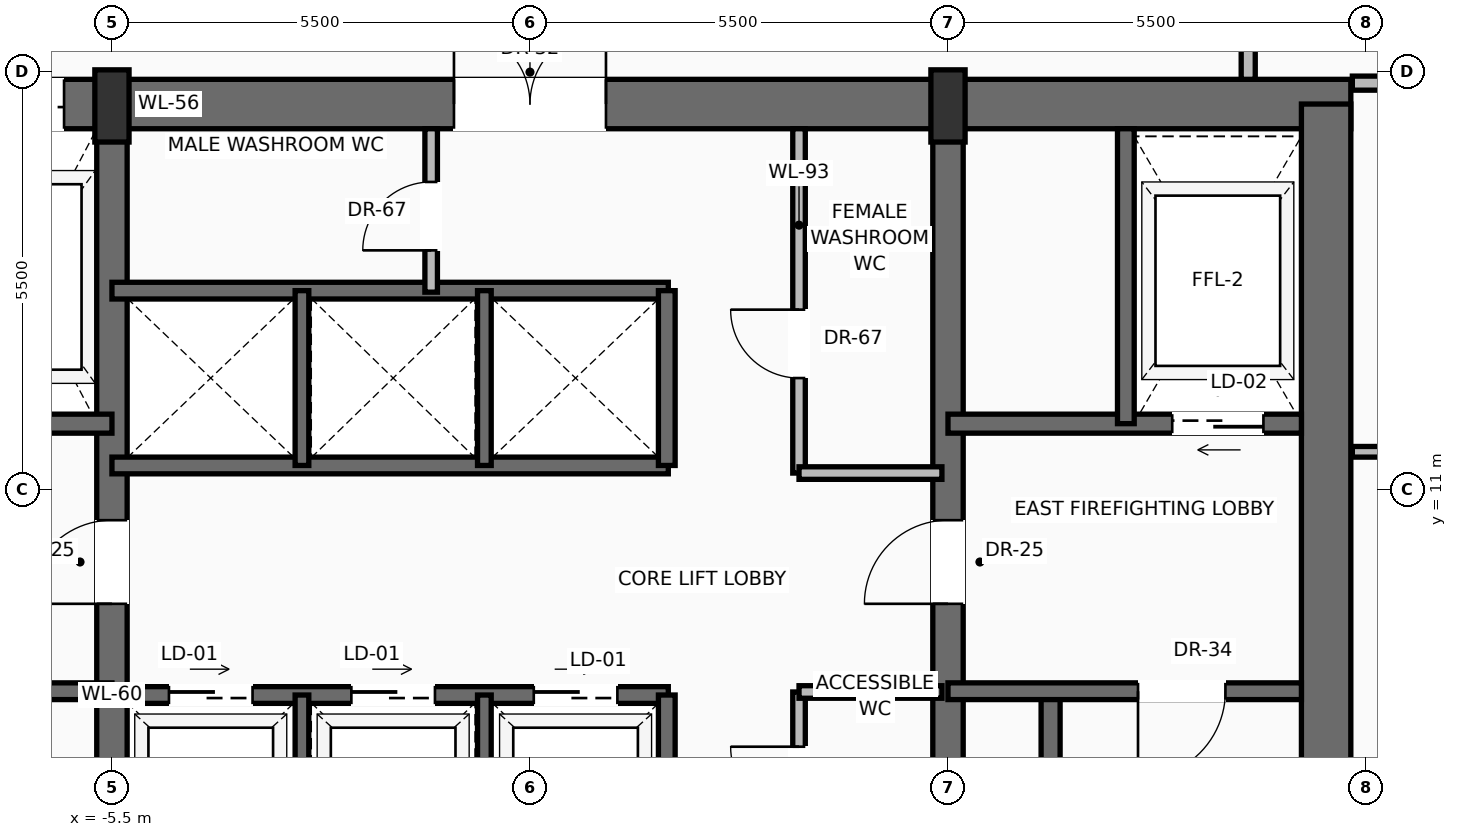
"""IFC4 building model, lengths in metres.
Left out: names, types, materials, properties, quantities, classifications, styles, units other than length and angle.
Written with IfcOpenShell. Run it as: python <this file> out.ifc"""

import sys

from ifc_helpers import new_model, si_unit, direction, frame, frame_2d, origin, origin_2d, place, context, subcontext, project, spatial, rectangle, extrude, source, transform, mapped, element, fill, save


model = new_model("IFC4")
c1 = context("Model", 3, precision=1e-05, world=origin(), true_north=direction((0.0, 1.0)))
c2 = subcontext(c1, "Body", "Model", "MODEL_VIEW")
j1 = project(units=[si_unit("LENGTHUNIT", "METRE"), si_unit("PLANEANGLEUNIT", "RADIAN")], contexts=[c1])
p1 = place(None, origin())
s1 = spatial("IfcSite", under=j1, at=p1, CompositionType="ELEMENT")
p2 = place(p1, origin())
s2 = spatial("IfcBuilding", under=s1, at=p2, CompositionType="ELEMENT")
p3 = place(p2, frame((0.0, 0.0, 193.2)))
s3 = spatial("IfcBuildingStorey", under=s2, at=p3, CompositionType="ELEMENT", Elevation=193.2)
p4 = place(p3, frame((-10.8, 16.075, 0.0), z_axis=(0.0, 0.0, 1.0), x_axis=(1.0, 0.0, 0.0)))
e1 = element("IfcWall", 1, at=p4, inside=s3, PredefinedType="SHEAR", context=c2, shape_type="SweptSolid", body=[
    extrude(rectangle(XDim=21.6, YDim=0.65, at=frame_2d((10.8, 0.0))), origin(), (0.0, 0.0, 1.0), 3.47),
])
p5 = place(p4, frame((3.37, 0.0, 0.0)))
e2 = element("IfcOpeningElement", 2, at=p5, cuts=e1, PredefinedType="OPENING", context=c2, shape_type="SweptSolid", body=[
    extrude(rectangle(XDim=1.3, YDim=2.3, at=frame_2d((0.65, 1.15))), frame((0.0, 0.335, 0.0), z_axis=(0.0, -1.0, 0.0), x_axis=(1.0, 0.0, 0.0)), (0.0, 0.0, 1.0), 0.67),
])
p6 = place(p4, frame((9.8, 0.0, 0.0)))
e3 = element("IfcOpeningElement", 3, at=p6, cuts=e1, PredefinedType="OPENING", context=c2, shape_type="SweptSolid", body=[
    extrude(rectangle(XDim=2.0, YDim=2.4, at=frame_2d((1.0, 1.2))), frame((0.0, 0.335, 0.0), z_axis=(0.0, -1.0, 0.0), x_axis=(1.0, 0.0, 0.0)), (0.0, 0.0, 1.0), 0.67),
])
p7 = place(p3, frame((10.475, 0.525, 0.0), z_axis=(0.0, 0.0, 1.0), x_axis=(0.0, 1.0, 0.0)))
e4 = element("IfcWall", 4, at=p7, inside=s3, PredefinedType="SHEAR", context=c2, shape_type="SweptSolid", body=[
    extrude(rectangle(XDim=15.55, YDim=0.65, at=frame_2d((7.775, 0.0))), origin(), (0.0, 0.0, 1.0), 3.47),
])
p8 = place(p3, frame((-5.5, 0.525, 0.0), z_axis=(0.0, 0.0, 1.0), x_axis=(0.0, 1.0, 0.0)))
e5 = element("IfcWall", 5, at=p8, inside=s3, PredefinedType="SHEAR", context=c2, shape_type="SweptSolid", body=[
    extrude(rectangle(XDim=15.55, YDim=0.4, at=frame_2d((7.775, 0.0))), origin(), (0.0, 0.0, 1.0), 3.47),
])
p9 = place(p8, frame((8.975, 0.0, 0.0)))
e6 = element("IfcOpeningElement", 6, at=p9, cuts=e5, PredefinedType="OPENING", context=c2, shape_type="SweptSolid", body=[
    extrude(rectangle(XDim=1.1, YDim=2.2, at=frame_2d((0.55, 1.1))), frame((0.0, 0.21, 0.0), z_axis=(0.0, -1.0, 0.0), x_axis=(1.0, 0.0, 0.0)), (0.0, 0.0, 1.0), 0.42),
])
p10 = place(p3, frame((5.5, 0.525, 0.0), z_axis=(0.0, 0.0, 1.0), x_axis=(0.0, 1.0, 0.0)))
e7 = element("IfcWall", 7, at=p10, inside=s3, PredefinedType="SHEAR", context=c2, shape_type="SweptSolid", body=[
    extrude(rectangle(XDim=15.55, YDim=0.4, at=frame_2d((7.775, 0.0))), origin(), (0.0, 0.0, 1.0), 3.47),
])
p11 = place(p10, frame((8.975, 0.0, 0.0)))
e8 = element("IfcOpeningElement", 8, at=p11, cuts=e7, PredefinedType="OPENING", context=c2, shape_type="SweptSolid", body=[
    extrude(rectangle(XDim=1.1, YDim=2.2, at=frame_2d((0.55, 1.1))), frame((0.0, 0.21, 0.0), z_axis=(0.0, -1.0, 0.0), x_axis=(1.0, 0.0, 0.0)), (0.0, 0.0, 1.0), 0.42),
])
m1 = source(origin(), c2, "Body", "SweptSolid", [
    extrude(rectangle(XDim=0.45, YDim=0.95, at=origin_2d()), origin(), (0.0, 0.0, 1.0), 3.7),
])
for number, where, z_axis, x_axis in (
    (9, (-5.5, 16.05, 0.0), (0.0, 0.0, 1.0), (1.0, 0.0, 0.0)),
    (10, (5.5, 16.05, 0.0), (0.0, 0.0, 1.0), (1.0, 0.0, 0.0)),
):
    element("IfcColumn", number, at=place(p3, frame(where, z_axis=z_axis, x_axis=x_axis)), inside=s3, PredefinedType="PILASTER", context=c2, shape_type="MappedRepresentation", body=[
        mapped(m1, transform((0.0, 0.0, 0.0), scale=1.0)),
    ])
p12 = place(p3, frame((9.726, 32.379, 0.0), z_axis=(0.0, 0.0, 1.0), x_axis=(0.534579680482, -0.845118077676, 0.0)))
e11 = element("IfcWall", 11, at=p12, inside=s3, PredefinedType="SOLIDWALL", context=c2, shape_type="SweptSolid", body=[
    extrude(rectangle(XDim=18.987, YDim=0.28, at=frame_2d((9.494, 0.0))), origin(), (0.0, 0.0, 1.0), 3.05),
])
p13 = place(p12, frame((4.557, 0.0, 0.0)))
e12 = element("IfcOpeningElement", 12, at=p13, cuts=e11, PredefinedType="OPENING", context=c2, shape_type="SweptSolid", body=[
    extrude(rectangle(XDim=1.6, YDim=2.35, at=frame_2d((0.8, 1.175))), frame((0.0, 0.15, 0.0), z_axis=(0.0, -1.0, 0.0), x_axis=(1.0, 0.0, 0.0)), (0.0, 0.0, 1.0), 0.3),
])
p14 = place(p12, frame((12.911, 0.0, 0.9)))
e13 = element("IfcOpeningElement", 13, at=p14, cuts=e11, PredefinedType="OPENING", context=c2, shape_type="SweptSolid", body=[
    extrude(rectangle(XDim=1.55, YDim=1.85, at=frame_2d((0.775, 0.925))), frame((0.0, 0.15, 0.0), z_axis=(0.0, -1.0, 0.0), x_axis=(1.0, 0.0, 0.0)), (0.0, 0.0, 1.0), 0.3),
])
p15 = place(p3, frame((-5.5, 8.35, 0.0), z_axis=(0.0, 0.0, 1.0), x_axis=(-1.0, 0.0, 0.0)))
e14 = element("IfcWall", 14, at=p15, inside=s3, PredefinedType="SOLIDWALL", context=c2, shape_type="SweptSolid", body=[
    extrude(rectangle(XDim=4.65, YDim=0.22, at=frame_2d((2.325, 0.0))), origin(), (0.0, 0.0, 1.0), 3.47),
])
p16 = place(p15, frame((2.5, 0.0, 0.0)))
e15 = element("IfcOpeningElement", 15, at=p16, cuts=e14, PredefinedType="OPENING", context=c2, shape_type="SweptSolid", body=[
    extrude(rectangle(XDim=1.15, YDim=2.2, at=frame_2d((0.575, 1.1))), frame((0.0, 0.12, 0.0), z_axis=(0.0, -1.0, 0.0), x_axis=(1.0, 0.0, 0.0)), (0.0, 0.0, 1.0), 0.24),
])
p17 = place(p3, frame((-5.5, 11.87, 0.0), z_axis=(0.0, 0.0, 1.0), x_axis=(-1.0, 0.0, 0.0)))
e16 = element("IfcWall", 16, at=p17, inside=s3, PredefinedType="SOLIDWALL", context=c2, shape_type="SweptSolid", body=[
    extrude(rectangle(XDim=4.65, YDim=0.25, at=frame_2d((2.325, 0.0))), origin(), (0.0, 0.0, 1.0), 3.47),
])
p18 = place(p17, frame((2.95, 0.0, 0.0)))
e17 = element("IfcOpeningElement", 17, at=p18, cuts=e16, PredefinedType="OPENING", context=c2, shape_type="SweptSolid", body=[
    extrude(rectangle(XDim=1.2, YDim=2.25, at=frame_2d((0.6, 1.125))), frame((0.0, 0.135, 0.0), z_axis=(0.0, -1.0, 0.0), x_axis=(1.0, 0.0, 0.0)), (0.0, 0.0, 1.0), 0.27),
])
p19 = place(p3, frame((6.85, 0.85, 0.0), z_axis=(0.0, 0.0, 1.0), x_axis=(0.0, 1.0, 0.0)))
e18 = element("IfcWall", 18, at=p19, inside=s3, PredefinedType="SOLIDWALL", context=c2, shape_type="SweptSolid", body=[
    extrude(rectangle(XDim=7.5, YDim=0.25, at=frame_2d((3.75, 0.0))), origin(), (0.0, 0.0, 1.0), 3.47),
])
p20 = place(p3, frame((10.15, 8.35, 0.0), z_axis=(0.0, 0.0, 1.0), x_axis=(-1.0, 0.0, 0.0)))
e19 = element("IfcWall", 19, at=p20, inside=s3, PredefinedType="SOLIDWALL", context=c2, shape_type="SweptSolid", body=[
    extrude(rectangle(XDim=4.65, YDim=0.22, at=frame_2d((2.325, 0.0))), origin(), (0.0, 0.0, 1.0), 3.47),
])
p21 = place(p20, frame((1.0, 0.0, 0.0)))
e20 = element("IfcOpeningElement", 20, at=p21, cuts=e19, PredefinedType="OPENING", context=c2, shape_type="SweptSolid", body=[
    extrude(rectangle(XDim=1.15, YDim=2.2, at=frame_2d((0.575, 1.1))), frame((0.0, 0.12, 0.0), z_axis=(0.0, -1.0, 0.0), x_axis=(1.0, 0.0, 0.0)), (0.0, 0.0, 1.0), 0.24),
])
p22 = place(p3, frame((10.15, 11.87, 0.0), z_axis=(0.0, 0.0, 1.0), x_axis=(-1.0, 0.0, 0.0)))
e21 = element("IfcWall", 21, at=p22, inside=s3, PredefinedType="SOLIDWALL", context=c2, shape_type="SweptSolid", body=[
    extrude(rectangle(XDim=4.65, YDim=0.25, at=frame_2d((2.325, 0.0))), origin(), (0.0, 0.0, 1.0), 3.47),
])
p23 = place(p22, frame((0.5, 0.0, 0.0)))
e22 = element("IfcOpeningElement", 22, at=p23, cuts=e21, PredefinedType="OPENING", context=c2, shape_type="SweptSolid", body=[
    extrude(rectangle(XDim=1.2, YDim=2.25, at=frame_2d((0.6, 1.125))), frame((0.0, 0.135, 0.0), z_axis=(0.0, -1.0, 0.0), x_axis=(1.0, 0.0, 0.0)), (0.0, 0.0, 1.0), 0.27),
])
p24 = place(p3, frame((7.84, 11.87, 0.0), z_axis=(0.0, 0.0, 1.0), x_axis=(0.0, 1.0, 0.0)))
e23 = element("IfcWall", 23, at=p24, inside=s3, PredefinedType="SOLIDWALL", context=c2, shape_type="SweptSolid", body=[
    extrude(rectangle(XDim=3.88, YDim=0.22, at=frame_2d((1.94, 0.0))), origin(), (0.0, 0.0, 1.0), 3.47),
])
p25 = place(p3, frame((3.54, 6.0, 0.0), z_axis=(0.0, 0.0, 1.0), x_axis=(0.0, 1.0, 0.0)))
e24 = element("IfcWall", 24, at=p25, inside=s3, PredefinedType="PARTITIONING", context=c2, shape_type="SweptSolid", body=[
    extrude(rectangle(XDim=2.34, YDim=0.165, at=frame_2d((1.17, 0.0))), origin(), (0.0, 0.0, 1.0), 3.462),
])
p26 = place(p25, frame((0.72, 0.0, 0.0)))
e25 = element("IfcOpeningElement", 25, at=p26, cuts=e24, PredefinedType="OPENING", context=c2, shape_type="SweptSolid", body=[
    extrude(rectangle(XDim=0.9, YDim=2.1, at=frame_2d((0.45, 1.05))), frame((0.0, 0.093, 0.0), z_axis=(0.0, -1.0, 0.0), x_axis=(1.0, 0.0, 0.0)), (0.0, 0.0, 1.0), 0.185),
])
p27 = place(p3, frame((3.54, 8.34, 0.0), z_axis=(0.0, 0.0, 1.0), x_axis=(1.0, 0.0, 0.0)))
e26 = element("IfcWall", 26, at=p27, inside=s3, PredefinedType="PARTITIONING", context=c2, shape_type="SweptSolid", body=[
    extrude(rectangle(XDim=1.88, YDim=0.165, at=frame_2d((0.94, 0.0))), origin(), (0.0, 0.0, 1.0), 3.462),
])
p28 = place(p3, frame((-5.5, 8.3, 0.0), z_axis=(0.0, 0.0, 1.0), x_axis=(1.0, 0.0, 0.0)))
e27 = element("IfcWall", 27, at=p28, inside=s3, PredefinedType="SOLIDWALL", context=c2, shape_type="SweptSolid", body=[
    extrude(rectangle(XDim=7.32, YDim=0.22, at=frame_2d((3.66, 0.0))), origin(), (0.0, 0.0, 1.0), 3.47),
])
p29 = place(p28, frame((0.75, 0.0, 0.0)))
e28 = element("IfcOpeningElement", 28, at=p29, cuts=e27, PredefinedType="OPENING", context=c2, shape_type="SweptSolid", body=[
    extrude(rectangle(XDim=1.1, YDim=2.2, at=frame_2d((0.55, 1.1))), frame((0.0, 0.12, 0.0), z_axis=(0.0, -1.0, 0.0), x_axis=(1.0, 0.0, 0.0)), (0.0, 0.0, 1.0), 0.24),
])
p30 = place(p28, frame((3.15, 0.0, 0.0)))
e29 = element("IfcOpeningElement", 29, at=p30, cuts=e27, PredefinedType="OPENING", context=c2, shape_type="SweptSolid", body=[
    extrude(rectangle(XDim=1.1, YDim=2.2, at=frame_2d((0.55, 1.1))), frame((0.0, 0.12, 0.0), z_axis=(0.0, -1.0, 0.0), x_axis=(1.0, 0.0, 0.0)), (0.0, 0.0, 1.0), 0.24),
])
p31 = place(p28, frame((5.55, 0.0, 0.0)))
e30 = element("IfcOpeningElement", 30, at=p31, cuts=e27, PredefinedType="OPENING", context=c2, shape_type="SweptSolid", body=[
    extrude(rectangle(XDim=1.1, YDim=2.2, at=frame_2d((0.55, 1.1))), frame((0.0, 0.12, 0.0), z_axis=(0.0, -1.0, 0.0), x_axis=(1.0, 0.0, 0.0)), (0.0, 0.0, 1.0), 0.24),
])
p32 = place(p3, frame((1.8, 6.0, 0.0), z_axis=(0.0, 0.0, 1.0), x_axis=(0.0, 1.0, 0.0)))
e31 = element("IfcWall", 31, at=p32, inside=s3, PredefinedType="SOLIDWALL", context=c2, shape_type="SweptSolid", body=[
    extrude(rectangle(XDim=2.3, YDim=0.22, at=frame_2d((1.15, 0.0))), origin(), (0.0, 0.0, 1.0), 3.47),
])
for number, where, z_axis, x_axis in (
    (32, (-3.0, 6.0, 0.0), (0.0, 0.0, 1.0), (0.0, 1.0, 0.0)),
    (33, (-0.6, 6.0, 0.0), (0.0, 0.0, 1.0), (0.0, 1.0, 0.0)),
):
    element("IfcWall", number, at=place(p3, frame(where, z_axis=z_axis, x_axis=x_axis)), inside=s3, PredefinedType="SOLIDWALL", context=c2, shape_type="SweptSolid", body=[
        extrude(rectangle(XDim=2.3, YDim=0.18, at=frame_2d((1.15, 0.0))), origin(), (0.0, 0.0, 1.0), 3.47),
    ])
for number, where, z_axis, x_axis in (
    (34, (-5.5, 11.32, 0.0), (0.0, 0.0, 1.0), (1.0, 0.0, 0.0)),
    (35, (-5.5, 13.62, 0.0), (0.0, 0.0, 1.0), (1.0, 0.0, 0.0)),
):
    element("IfcWall", number, at=place(p3, frame(where, z_axis=z_axis, x_axis=x_axis)), inside=s3, PredefinedType="SOLIDWALL", context=c2, shape_type="SweptSolid", body=[
        extrude(rectangle(XDim=7.32, YDim=0.22, at=frame_2d((3.66, 0.0))), origin(), (0.0, 0.0, 1.0), 3.47),
    ])
p33 = place(p3, frame((1.8, 11.32, 0.0), z_axis=(0.0, 0.0, 1.0), x_axis=(0.0, 1.0, 0.0)))
e36 = element("IfcWall", 36, at=p33, inside=s3, PredefinedType="SOLIDWALL", context=c2, shape_type="SweptSolid", body=[
    extrude(rectangle(XDim=2.3, YDim=0.22, at=frame_2d((1.15, 0.0))), origin(), (0.0, 0.0, 1.0), 3.47),
])
for number, where, z_axis, x_axis in (
    (37, (-3.0, 11.32, 0.0), (0.0, 0.0, 1.0), (0.0, 1.0, 0.0)),
    (38, (-0.6, 11.32, 0.0), (0.0, 0.0, 1.0), (0.0, 1.0, 0.0)),
):
    element("IfcWall", number, at=place(p3, frame(where, z_axis=z_axis, x_axis=x_axis)), inside=s3, PredefinedType="SOLIDWALL", context=c2, shape_type="SweptSolid", body=[
        extrude(rectangle(XDim=2.3, YDim=0.18, at=frame_2d((1.15, 0.0))), origin(), (0.0, 0.0, 1.0), 3.47),
    ])
p34 = place(p3, frame((-1.3, 13.6, 0.0), z_axis=(0.0, 0.0, 1.0), x_axis=(0.0, 1.0, 0.0)))
e39 = element("IfcWall", 39, at=p34, inside=s3, PredefinedType="PARTITIONING", context=c2, shape_type="SweptSolid", body=[
    extrude(rectangle(XDim=2.15, YDim=0.165, at=frame_2d((1.075, 0.0))), origin(), (0.0, 0.0, 1.0), 3.462),
])
p35 = place(p34, frame((0.55, 0.0, 0.0)))
e40 = element("IfcOpeningElement", 40, at=p35, cuts=e39, PredefinedType="OPENING", context=c2, shape_type="SweptSolid", body=[
    extrude(rectangle(XDim=0.9, YDim=2.1, at=frame_2d((0.45, 1.05))), frame((0.0, 0.093, 0.0), z_axis=(0.0, -1.0, 0.0), x_axis=(1.0, 0.0, 0.0)), (0.0, 0.0, 1.0), 0.185),
])
p36 = place(p3, frame((3.54, 11.22, 0.0), z_axis=(0.0, 0.0, 1.0), x_axis=(0.0, 1.0, 0.0)))
e41 = element("IfcWall", 41, at=p36, inside=s3, PredefinedType="PARTITIONING", context=c2, shape_type="SweptSolid", body=[
    extrude(rectangle(XDim=4.53, YDim=0.165, at=frame_2d((2.265, 0.0))), origin(), (0.0, 0.0, 1.0), 3.462),
])
p37 = place(p36, frame((1.25, 0.0, 0.0)))
e42 = element("IfcOpeningElement", 42, at=p37, cuts=e41, PredefinedType="OPENING", context=c2, shape_type="SweptSolid", body=[
    extrude(rectangle(XDim=0.9, YDim=2.1, at=frame_2d((0.45, 1.05))), frame((0.0, 0.093, 0.0), z_axis=(0.0, -1.0, 0.0), x_axis=(1.0, 0.0, 0.0)), (0.0, 0.0, 1.0), 0.185),
])
p38 = place(p3, frame((3.54, 11.22, 0.0), z_axis=(0.0, 0.0, 1.0), x_axis=(1.0, 0.0, 0.0)))
e43 = element("IfcWall", 43, at=p38, inside=s3, PredefinedType="PARTITIONING", context=c2, shape_type="SweptSolid", body=[
    extrude(rectangle(XDim=1.88, YDim=0.165, at=frame_2d((0.94, 0.0))), origin(), (0.0, 0.0, 1.0), 3.462),
])
p39 = place(p3, frame((9.45, 16.4, 0.0), z_axis=(0.0, 0.0, 1.0), x_axis=(0.0, 1.0, 0.0)))
e44 = element("IfcWall", 44, at=p39, inside=s3, PredefinedType="PARTITIONING", context=c2, shape_type="SweptSolid", body=[
    extrude(rectangle(XDim=7.0, YDim=0.185, at=frame_2d((3.5, 0.0))), origin(), (0.0, 0.0, 1.0), 3.462),
])
p40 = place(p39, frame((3.341, 0.0, 0.0)))
e45 = element("IfcOpeningElement", 45, at=p40, cuts=e44, PredefinedType="OPENING", context=c2, shape_type="SweptSolid", body=[
    extrude(rectangle(XDim=0.95, YDim=2.2, at=frame_2d((0.475, 1.1))), frame((0.0, 0.103, 0.0), z_axis=(0.0, -1.0, 0.0), x_axis=(1.0, 0.0, 0.0)), (0.0, 0.0, 1.0), 0.205),
])
p41 = place(p3, frame((10.82, 16.35, 0.0), z_axis=(0.0, 0.0, 1.0), x_axis=(1.0, 0.0, 0.0)))
e46 = element("IfcWall", 46, at=p41, inside=s3, PredefinedType="PARTITIONING", context=c2, shape_type="SweptSolid", body=[
    extrude(rectangle(XDim=9.199, YDim=0.185, at=frame_2d((4.599, 0.0))), origin(), (0.0, 0.0, 1.0), 3.462),
])
p42 = place(p41, frame((2.847, 0.0, 0.0)))
e47 = element("IfcOpeningElement", 47, at=p42, cuts=e46, PredefinedType="OPENING", context=c2, shape_type="SweptSolid", body=[
    extrude(rectangle(XDim=0.95, YDim=2.2, at=frame_2d((0.475, 1.1))), frame((0.0, 0.103, 0.0), z_axis=(0.0, -1.0, 0.0), x_axis=(1.0, 0.0, 0.0)), (0.0, 0.0, 1.0), 0.205),
])
p43 = place(p3, frame((10.82, 11.5, 0.0), z_axis=(0.0, 0.0, 1.0), x_axis=(1.0, 0.0, 0.0)))
e48 = element("IfcWall", 48, at=p43, inside=s3, PredefinedType="PARTITIONING", context=c2, shape_type="SweptSolid", body=[
    extrude(rectangle(XDim=12.267, YDim=0.14, at=frame_2d((6.133, 0.0))), origin(), (0.0, 0.0, 1.0), 3.462),
])
p44 = place(p43, frame((5.651, 0.0, 0.0)))
e49 = element("IfcOpeningElement", 49, at=p44, cuts=e48, PredefinedType="OPENING", context=c2, shape_type="SweptSolid", body=[
    extrude(rectangle(XDim=0.95, YDim=2.2, at=frame_2d((0.475, 1.1))), frame((0.0, 0.08, 0.0), z_axis=(0.0, -1.0, 0.0), x_axis=(1.0, 0.0, 0.0)), (0.0, 0.0, 1.0), 0.16),
])
m2 = source(origin(), c2, "Body", "SweptSolid", [
    extrude(rectangle(XDim=1.1, YDim=2.2, at=frame_2d((0.55, 1.1))), frame((0.0, 0.025, 0.0), z_axis=(0.0, -1.0, 0.0), x_axis=(1.0, 0.0, 0.0)), (0.0, 0.0, 1.0), 0.05),
])
p45 = place(p9, origin())
e50 = element("IfcDoor", 50, at=p45, inside=s3, OperationType="SINGLE_SWING_LEFT", PredefinedType="DOOR", context=c2, shape_type="MappedRepresentation", body=[
    mapped(m2, transform((0.0, 0.0, 0.0), scale=1.0)),
])
fill(e6, e50)
m3 = source(origin(), c2, "Body", "SweptSolid", [
    extrude(rectangle(XDim=1.3, YDim=2.3, at=frame_2d((0.65, 1.15))), frame((0.0, 0.025, 0.0), z_axis=(0.0, -1.0, 0.0), x_axis=(1.0, 0.0, 0.0)), (0.0, 0.0, 1.0), 0.05),
])
p46 = place(p5, origin())
e51 = element("IfcDoor", 51, at=p46, inside=s3, OperationType="SLIDING_TO_RIGHT", PredefinedType="DOOR", context=c2, shape_type="MappedRepresentation", body=[
    mapped(m3, transform((0.0, 0.0, 0.0), scale=1.0)),
])
fill(e2, e51)
m4 = source(origin(), c2, "Body", "SweptSolid", [
    extrude(rectangle(XDim=1.15, YDim=2.2, at=frame_2d((0.575, 1.1))), frame((0.0, 0.025, 0.0), z_axis=(0.0, -1.0, 0.0), x_axis=(1.0, 0.0, 0.0)), (0.0, 0.0, 1.0), 0.05),
])
p47 = place(p21, origin())
e52 = element("IfcDoor", 52, at=p47, inside=s3, OperationType="SINGLE_SWING_RIGHT", PredefinedType="DOOR", context=c2, shape_type="MappedRepresentation", body=[
    mapped(m4, transform((0.0, 0.0, 0.0), scale=1.0)),
])
fill(e20, e52)
p48 = place(p11, origin())
e53 = element("IfcDoor", 53, at=p48, inside=s3, OperationType="SINGLE_SWING_LEFT", PredefinedType="DOOR", context=c2, shape_type="MappedRepresentation", body=[
    mapped(m2, transform((0.0, 0.0, 0.0), scale=1.0)),
])
fill(e8, e53)
m5 = source(origin(), c2, "Body", "SweptSolid", [
    extrude(rectangle(XDim=1.2, YDim=2.25, at=frame_2d((0.6, 1.125))), frame((0.0, 0.025, 0.0), z_axis=(0.0, -1.0, 0.0), x_axis=(1.0, 0.0, 0.0)), (0.0, 0.0, 1.0), 0.05),
])
p49 = place(p23, origin())
e54 = element("IfcDoor", 54, at=p49, inside=s3, OperationType="SLIDING_TO_RIGHT", PredefinedType="DOOR", context=c2, shape_type="MappedRepresentation", body=[
    mapped(m5, transform((0.0, 0.0, 0.0), scale=1.0)),
])
fill(e22, e54)
m6 = source(origin(), c2, "Body", "SweptSolid", [
    extrude(rectangle(XDim=2.0, YDim=2.4, at=frame_2d((1.0, 1.2))), frame((0.0, 0.025, 0.0), z_axis=(0.0, -1.0, 0.0), x_axis=(1.0, 0.0, 0.0)), (0.0, 0.0, 1.0), 0.05),
])
p50 = place(p6, origin())
e55 = element("IfcDoor", 55, at=p50, inside=s3, OperationType="DOUBLE_DOOR_SINGLE_SWING", PredefinedType="DOOR", context=c2, shape_type="MappedRepresentation", body=[
    mapped(m6, transform((0.0, 0.0, 0.0), scale=1.0)),
])
fill(e3, e55)
m7 = source(origin(), c2, "Body", "SweptSolid", [
    extrude(rectangle(XDim=0.9, YDim=2.1, at=frame_2d((0.45, 1.05))), frame((0.0, 0.025, 0.0), z_axis=(0.0, -1.0, 0.0), x_axis=(1.0, 0.0, 0.0)), (0.0, 0.0, 1.0), 0.05),
])
p51 = place(p26, origin())
e56 = element("IfcDoor", 56, at=p51, inside=s3, OperationType="SINGLE_SWING_RIGHT", PredefinedType="DOOR", context=c2, shape_type="MappedRepresentation", body=[
    mapped(m7, transform((0.0, 0.0, 0.0), scale=1.0)),
])
fill(e25, e56)
m8 = source(origin(), c2, "Body", "SweptSolid", [
    extrude(rectangle(XDim=1.1, YDim=2.2, at=frame_2d((0.55, 1.1))), frame((0.0, 0.025, 0.0), z_axis=(0.0, -1.0, 0.0), x_axis=(1.0, 0.0, 0.0)), (0.0, 0.0, 1.0), 0.05),
])
p52 = place(p29, origin())
e57 = element("IfcDoor", 57, at=p52, inside=s3, OperationType="SLIDING_TO_LEFT", PredefinedType="DOOR", context=c2, shape_type="MappedRepresentation", body=[
    mapped(m8, transform((0.0, 0.0, 0.0), scale=1.0)),
])
fill(e28, e57)
p53 = place(p30, origin())
e58 = element("IfcDoor", 58, at=p53, inside=s3, OperationType="SLIDING_TO_LEFT", PredefinedType="DOOR", context=c2, shape_type="MappedRepresentation", body=[
    mapped(m8, transform((0.0, 0.0, 0.0), scale=1.0)),
])
fill(e29, e58)
p54 = place(p31, origin())
e59 = element("IfcDoor", 59, at=p54, inside=s3, OperationType="SLIDING_TO_LEFT", PredefinedType="DOOR", context=c2, shape_type="MappedRepresentation", body=[
    mapped(m8, transform((0.0, 0.0, 0.0), scale=1.0)),
])
fill(e30, e59)
p55 = place(p35, origin())
e60 = element("IfcDoor", 60, at=p55, inside=s3, OperationType="SINGLE_SWING_LEFT", PredefinedType="DOOR", context=c2, shape_type="MappedRepresentation", body=[
    mapped(m7, transform((0.0, 0.0, 0.0), scale=1.0)),
])
fill(e40, e60)
p56 = place(p37, origin())
e61 = element("IfcDoor", 61, at=p56, inside=s3, OperationType="SINGLE_SWING_RIGHT", PredefinedType="DOOR", context=c2, shape_type="MappedRepresentation", body=[
    mapped(m7, transform((0.0, 0.0, 0.0), scale=1.0)),
])
fill(e42, e61)
save(model, sys.argv[1])
